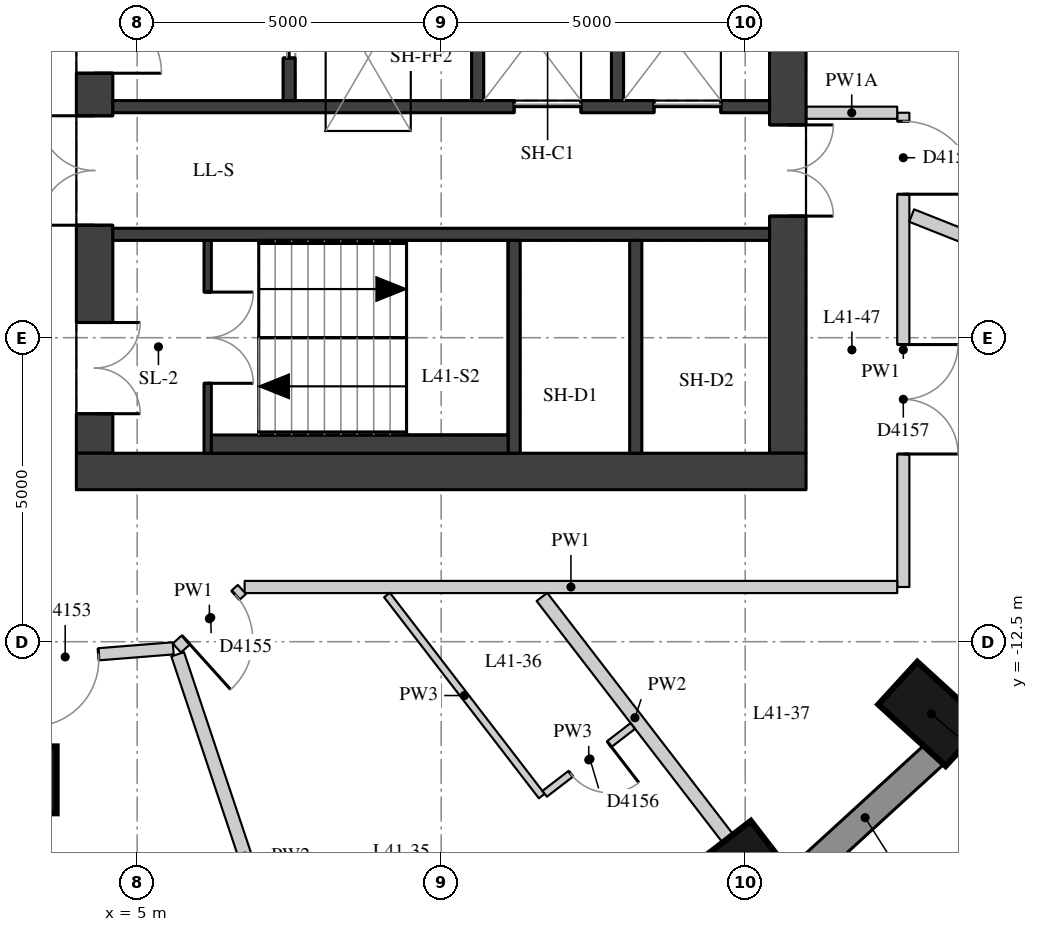
"""IFC4 building model, lengths in metres.
Left out: names, types, materials, properties, quantities, classifications, styles, units other than length and angle.
Written with IfcOpenShell. Run it as: python <this file> out.ifc"""

import sys

from ifc_helpers import new_model, si_unit, direction, frame, frame_2d, origin, origin_2d, place, context, subcontext, project, spatial, rectangle, extrude, element, fill, save


model = new_model("IFC4")
c1 = context("Model", 3, precision=1e-05, world=origin(), true_north=direction((0.0, 1.0)))
c2 = subcontext(c1, "Body", "Model", "MODEL_VIEW")
j1 = project(units=[si_unit("LENGTHUNIT", "METRE"), si_unit("PLANEANGLEUNIT", "RADIAN")], contexts=[c1])
p1 = place(None, origin())
s1 = spatial("IfcSite", under=j1, at=p1, CompositionType="ELEMENT")
p2 = place(p1, origin())
s2 = spatial("IfcBuilding", under=s1, at=p2, CompositionType="ELEMENT")
p3 = place(p2, frame((0.0, 0.0, 148.4)))
s3 = spatial("IfcBuildingStorey", under=s2, at=p3, CompositionType="ELEMENT", Elevation=148.4)
for number, where, z_axis, x_axis in (
    (1, (15.173, -16.332, 0.0), (0.0, 0.0, 1.0), (0.61, -0.792, 0.0)),
    (2, (18.064, -13.688, 0.0), (0.0, 0.0, 1.0), (0.738, -0.675, 0.0)),
):
    element("IfcColumn", number, at=place(p3, frame(where, z_axis=z_axis, x_axis=x_axis)), inside=s3, PredefinedType="COLUMN", context=c2, shape_type="SweptSolid", body=[
        extrude(rectangle(XDim=1.5, YDim=0.95, at=origin_2d()), origin(), (0.0, 0.0, 1.0), 3.3),
    ])
p4 = place(p3, frame((3.126, -14.772, 0.0), z_axis=(0.0, 0.0, 1.0), x_axis=(1.0, 0.0, 0.0)))
e3 = element("IfcColumn", 3, at=p4, inside=s3, PredefinedType="COLUMN", context=c2, shape_type="SweptSolid", body=[
    extrude(rectangle(XDim=1.1, YDim=1.1, at=origin_2d()), origin(), (0.0, 0.0, 1.0), 3.3),
])
p5 = place(p3, frame((15.83, -16.439, 0.0), z_axis=(0.0, 0.0, 1.0), x_axis=(0.737808755941, 0.675009807082, 0.0)))
e4 = element("IfcWall", 4, at=p5, inside=s3, PredefinedType="SOLIDWALL", context=c2, shape_type="SweptSolid", body=[
    extrude(rectangle(XDim=3.094, YDim=0.45, at=frame_2d((1.547, 0.0))), origin(), (0.0, 0.0, 1.0), 3.02),
])
p6 = place(p3, frame((4.3, -9.4, 0.0), z_axis=(0.0, 0.0, 1.0), x_axis=(0.0, 1.0, 0.0)))
e5 = element("IfcWall", 5, at=p6, inside=s3, PredefinedType="SHEAR", context=c2, shape_type="SweptSolid", body=[
    extrude(rectangle(XDim=18.8, YDim=0.6, at=frame_2d((9.4, 0.0))), origin(), (0.0, 0.0, 1.0), 3.02),
])
p7 = place(p6, frame((0.65, 0.0, 0.0)))
e6 = element("IfcOpeningElement", 6, at=p7, cuts=e5, PredefinedType="OPENING", context=c2, shape_type="SweptSolid", body=[
    extrude(rectangle(XDim=1.5, YDim=2.1, at=frame_2d((0.75, 1.05))), frame((0.0, 0.31, 0.0), z_axis=(0.0, -1.0, 0.0), x_axis=(1.0, 0.0, 0.0)), (0.0, 0.0, 1.0), 0.62),
])
p8 = place(p6, frame((3.75, 0.0, 0.0)))
e7 = element("IfcOpeningElement", 7, at=p8, cuts=e5, PredefinedType="OPENING", context=c2, shape_type="SweptSolid", body=[
    extrude(rectangle(XDim=1.8, YDim=2.1, at=frame_2d((0.9, 1.05))), frame((0.0, 0.31, 0.0), z_axis=(0.0, -1.0, 0.0), x_axis=(1.0, 0.0, 0.0)), (0.0, 0.0, 1.0), 0.62),
])
p9 = place(p6, frame((6.25, 0.0, 0.0)))
e8 = element("IfcOpeningElement", 8, at=p9, cuts=e5, PredefinedType="OPENING", context=c2, shape_type="SweptSolid", body=[
    extrude(rectangle(XDim=1.1, YDim=2.1, at=frame_2d((0.55, 1.05))), frame((0.0, 0.31, 0.0), z_axis=(0.0, -1.0, 0.0), x_axis=(1.0, 0.0, 0.0)), (0.0, 0.0, 1.0), 0.62),
])
p10 = place(p6, frame((8.9, 0.0, 0.0)))
e9 = element("IfcOpeningElement", 9, at=p10, cuts=e5, PredefinedType="OPENING", context=c2, shape_type="SweptSolid", body=[
    extrude(rectangle(XDim=1.0, YDim=2.1, at=frame_2d((0.5, 1.05))), frame((0.0, 0.31, 0.0), z_axis=(0.0, -1.0, 0.0), x_axis=(1.0, 0.0, 0.0)), (0.0, 0.0, 1.0), 0.62),
])
p11 = place(p6, frame((11.45, 0.0, 0.0)))
e10 = element("IfcOpeningElement", 10, at=p11, cuts=e5, PredefinedType="OPENING", context=c2, shape_type="SweptSolid", body=[
    extrude(rectangle(XDim=1.1, YDim=2.1, at=frame_2d((0.55, 1.05))), frame((0.0, 0.31, 0.0), z_axis=(0.0, -1.0, 0.0), x_axis=(1.0, 0.0, 0.0)), (0.0, 0.0, 1.0), 0.62),
])
p12 = place(p6, frame((13.25, 0.0, 0.0)))
e11 = element("IfcOpeningElement", 11, at=p12, cuts=e5, PredefinedType="OPENING", context=c2, shape_type="SweptSolid", body=[
    extrude(rectangle(XDim=1.8, YDim=2.1, at=frame_2d((0.9, 1.05))), frame((0.0, 0.31, 0.0), z_axis=(0.0, -1.0, 0.0), x_axis=(1.0, 0.0, 0.0)), (0.0, 0.0, 1.0), 0.62),
])
p13 = place(p6, frame((16.65, 0.0, 0.0)))
e12 = element("IfcOpeningElement", 12, at=p13, cuts=e5, PredefinedType="OPENING", context=c2, shape_type="SweptSolid", body=[
    extrude(rectangle(XDim=1.5, YDim=2.1, at=frame_2d((0.75, 1.05))), frame((0.0, 0.31, 0.0), z_axis=(0.0, -1.0, 0.0), x_axis=(1.0, 0.0, 0.0)), (0.0, 0.0, 1.0), 0.62),
])
p14 = place(p3, frame((15.7, -9.4, 0.0), z_axis=(0.0, 0.0, 1.0), x_axis=(0.0, 1.0, 0.0)))
e13 = element("IfcWall", 13, at=p14, inside=s3, PredefinedType="SHEAR", context=c2, shape_type="SweptSolid", body=[
    extrude(rectangle(XDim=18.8, YDim=0.6, at=frame_2d((9.4, 0.0))), origin(), (0.0, 0.0, 1.0), 3.02),
])
p15 = place(p14, frame((13.4, 0.0, 0.0)))
e14 = element("IfcOpeningElement", 14, at=p15, cuts=e13, PredefinedType="OPENING", context=c2, shape_type="SweptSolid", body=[
    extrude(rectangle(XDim=1.5, YDim=2.1, at=frame_2d((0.75, 1.05))), frame((0.0, 0.31, 0.0), z_axis=(0.0, -1.0, 0.0), x_axis=(1.0, 0.0, 0.0)), (0.0, 0.0, 1.0), 0.62),
])
p16 = place(p14, frame((3.9, 0.0, 0.0)))
e15 = element("IfcOpeningElement", 15, at=p16, cuts=e13, PredefinedType="OPENING", context=c2, shape_type="SweptSolid", body=[
    extrude(rectangle(XDim=1.5, YDim=2.1, at=frame_2d((0.75, 1.05))), frame((0.0, 0.31, 0.0), z_axis=(0.0, -1.0, 0.0), x_axis=(1.0, 0.0, 0.0)), (0.0, 0.0, 1.0), 0.62),
])
p17 = place(p3, frame((4.0, -9.7, 0.0), z_axis=(0.0, 0.0, 1.0), x_axis=(1.0, 0.0, 0.0)))
e16 = element("IfcWall", 16, at=p17, inside=s3, PredefinedType="SHEAR", context=c2, shape_type="SweptSolid", body=[
    extrude(rectangle(XDim=12.0, YDim=0.6, at=frame_2d((6.0, 0.0))), origin(), (0.0, 0.0, 1.0), 3.02),
])
p18 = place(p3, frame((4.6, -3.7, 0.0), z_axis=(0.0, 0.0, 1.0), x_axis=(1.0, 0.0, 0.0)))
e17 = element("IfcWall", 17, at=p18, inside=s3, PredefinedType="SHEAR", context=c2, shape_type="SweptSolid", body=[
    extrude(rectangle(XDim=10.8, YDim=0.2, at=frame_2d((5.4, 0.0))), origin(), (0.0, 0.0, 1.0), 3.02),
])
p19 = place(p18, frame((6.6, 0.0, 0.0)))
e18 = element("IfcOpeningElement", 18, at=p19, cuts=e17, PredefinedType="OPENING", context=c2, shape_type="SweptSolid", body=[
    extrude(rectangle(XDim=1.1, YDim=2.1, at=frame_2d((0.55, 1.05))), frame((0.0, 0.11, 0.0), z_axis=(0.0, -1.0, 0.0), x_axis=(1.0, 0.0, 0.0)), (0.0, 0.0, 1.0), 0.22),
])
p20 = place(p18, frame((8.9, 0.0, 0.0)))
e19 = element("IfcOpeningElement", 19, at=p20, cuts=e17, PredefinedType="OPENING", context=c2, shape_type="SweptSolid", body=[
    extrude(rectangle(XDim=1.1, YDim=2.1, at=frame_2d((0.55, 1.05))), frame((0.0, 0.11, 0.0), z_axis=(0.0, -1.0, 0.0), x_axis=(1.0, 0.0, 0.0)), (0.0, 0.0, 1.0), 0.22),
])
p21 = place(p3, frame((4.6, -5.8, 0.0), z_axis=(0.0, 0.0, 1.0), x_axis=(1.0, 0.0, 0.0)))
e20 = element("IfcWall", 20, at=p21, inside=s3, PredefinedType="SHEAR", context=c2, shape_type="SweptSolid", body=[
    extrude(rectangle(XDim=10.8, YDim=0.2, at=frame_2d((5.4, 0.0))), origin(), (0.0, 0.0, 1.0), 3.02),
])
for number, where, z_axis, x_axis in (
    (21, (11.2, -9.4, 0.0), (0.0, 0.0, 1.0), (0.0, 1.0, 0.0)),
    (22, (13.2, -9.4, 0.0), (0.0, 0.0, 1.0), (0.0, 1.0, 0.0)),
):
    element("IfcWall", number, at=place(p3, frame(where, z_axis=z_axis, x_axis=x_axis)), inside=s3, PredefinedType="SHEAR", context=c2, shape_type="SweptSolid", body=[
        extrude(rectangle(XDim=3.5, YDim=0.2, at=frame_2d((1.75, 0.0))), origin(), (0.0, 0.0, 1.0), 3.02),
    ])
p22 = place(p3, frame((7.5, -3.6, 0.0), z_axis=(0.0, 0.0, 1.0), x_axis=(0.0, 1.0, 0.0)))
e23 = element("IfcWall", 23, at=p22, inside=s3, PredefinedType="SHEAR", context=c2, shape_type="SweptSolid", body=[
    extrude(rectangle(XDim=2.5, YDim=0.2, at=frame_2d((1.25, 0.0))), origin(), (0.0, 0.0, 1.0), 3.02),
])
p23 = place(p22, frame((0.7, 0.0, 0.0)))
e24 = element("IfcOpeningElement", 24, at=p23, cuts=e23, PredefinedType="OPENING", context=c2, shape_type="SweptSolid", body=[
    extrude(rectangle(XDim=1.1, YDim=2.1, at=frame_2d((0.55, 1.05))), frame((0.0, 0.11, 0.0), z_axis=(0.0, -1.0, 0.0), x_axis=(1.0, 0.0, 0.0)), (0.0, 0.0, 1.0), 0.22),
])
for number, where, z_axis, x_axis in (
    (25, (10.6, -3.6, 0.0), (0.0, 0.0, 1.0), (0.0, 1.0, 0.0)),
    (26, (12.9, -3.6, 0.0), (0.0, 0.0, 1.0), (0.0, 1.0, 0.0)),
):
    element("IfcWall", number, at=place(p3, frame(where, z_axis=z_axis, x_axis=x_axis)), inside=s3, PredefinedType="SHEAR", context=c2, shape_type="SweptSolid", body=[
        extrude(rectangle(XDim=2.5, YDim=0.2, at=frame_2d((1.25, 0.0))), origin(), (0.0, 0.0, 1.0), 3.02),
    ])
p24 = place(p3, frame((6.16, -9.4, 0.0), z_axis=(0.0, 0.0, 1.0), x_axis=(0.0, 1.0, 0.0)))
e27 = element("IfcWall", 27, at=p24, inside=s3, PredefinedType="SHEAR", context=c2, shape_type="SweptSolid", body=[
    extrude(rectangle(XDim=3.5, YDim=0.12, at=frame_2d((1.75, 0.0))), origin(), (0.0, 0.0, 1.0), 3.02),
])
p25 = place(p24, frame((1.15, 0.0, 0.0)))
e28 = element("IfcOpeningElement", 28, at=p25, cuts=e27, PredefinedType="OPENING", context=c2, shape_type="SweptSolid", body=[
    extrude(rectangle(XDim=1.5, YDim=2.1, at=frame_2d((0.75, 1.05))), frame((0.0, 0.07, 0.0), z_axis=(0.0, -1.0, 0.0), x_axis=(1.0, 0.0, 0.0)), (0.0, 0.0, 1.0), 0.14),
])
p26 = place(p3, frame((6.22, -9.25, 0.0), z_axis=(0.0, 0.0, 1.0), x_axis=(1.0, 0.0, 0.0)))
e29 = element("IfcWall", 29, at=p26, inside=s3, PredefinedType="PARTITIONING", context=c2, shape_type="SweptSolid", body=[
    extrude(rectangle(XDim=4.88, YDim=0.3, at=frame_2d((2.44, 0.0))), origin(), (0.0, 0.0, 1.0), 3.02),
])
p27 = place(p3, frame((17.6, -3.8, 0.0), z_axis=(0.0, 0.0, 1.0), x_axis=(0.0, -1.0, 0.0)))
e30 = element("IfcWall", 30, at=p27, inside=s3, PredefinedType="PARTITIONING", context=c2, shape_type="SweptSolid", body=[
    extrude(rectangle(XDim=7.8, YDim=0.2, at=frame_2d((3.9, 0.0))), origin(), (0.0, 0.0, 1.0), 3.02),
])
p28 = place(p27, frame((3.813, 0.0, 0.0)))
e31 = element("IfcOpeningElement", 31, at=p28, cuts=e30, PredefinedType="OPENING", context=c2, shape_type="SweptSolid", body=[
    extrude(rectangle(XDim=1.8, YDim=2.1, at=frame_2d((0.9, 1.05))), frame((0.0, 0.11, 0.0), z_axis=(0.0, -1.0, 0.0), x_axis=(1.0, 0.0, 0.0)), (0.0, 0.0, 1.0), 0.22),
])
p29 = place(p27, frame((0.14, 0.0, 0.0)))
e32 = element("IfcOpeningElement", 32, at=p29, cuts=e30, PredefinedType="OPENING", context=c2, shape_type="SweptSolid", body=[
    extrude(rectangle(XDim=1.2, YDim=2.1, at=frame_2d((0.6, 1.05))), frame((0.0, 0.11, 0.0), z_axis=(0.0, -1.0, 0.0), x_axis=(1.0, 0.0, 0.0)), (0.0, 0.0, 1.0), 0.22),
])
p30 = place(p3, frame((17.5, -11.6, 0.0), z_axis=(0.0, 0.0, 1.0), x_axis=(-1.0, 0.0, 0.0)))
e33 = element("IfcWall", 33, at=p30, inside=s3, PredefinedType="PARTITIONING", context=c2, shape_type="SweptSolid", body=[
    extrude(rectangle(XDim=10.732, YDim=0.2, at=frame_2d((5.366, 0.0))), origin(), (0.0, 0.0, 1.0), 3.02),
])
p31 = place(p3, frame((6.723, -11.64, 0.0), z_axis=(0.0, 0.0, 1.0), x_axis=(-0.743032656565, -0.669255161562, 0.0)))
e34 = element("IfcWall", 34, at=p31, inside=s3, PredefinedType="PARTITIONING", context=c2, shape_type="SweptSolid", body=[
    extrude(rectangle(XDim=1.439, YDim=0.2, at=frame_2d((0.72, 0.0))), origin(), (0.0, 0.0, 1.0), 3.02),
])
p32 = place(p31, frame((0.14, 0.0, 0.0)))
e35 = element("IfcOpeningElement", 35, at=p32, cuts=e34, PredefinedType="OPENING", context=c2, shape_type="SweptSolid", body=[
    extrude(rectangle(XDim=1.1, YDim=2.1, at=frame_2d((0.55, 1.05))), frame((0.0, 0.11, 0.0), z_axis=(0.0, -1.0, 0.0), x_axis=(1.0, 0.0, 0.0)), (0.0, 0.0, 1.0), 0.22),
])
p33 = place(p3, frame((5.593, -12.609, 0.0), z_axis=(0.0, 0.0, 1.0), x_axis=(-0.99682930336, -0.079569717626, 0.0)))
e36 = element("IfcWall", 36, at=p33, inside=s3, PredefinedType="PARTITIONING", context=c2, shape_type="SweptSolid", body=[
    extrude(rectangle(XDim=8.349, YDim=0.2, at=frame_2d((4.174, 0.0))), origin(), (0.0, 0.0, 1.0), 3.02),
])
p34 = place(p33, frame((1.232, 0.0, 0.0)))
e37 = element("IfcOpeningElement", 37, at=p34, cuts=e36, PredefinedType="OPENING", context=c2, shape_type="SweptSolid", body=[
    extrude(rectangle(XDim=1.1, YDim=2.1, at=frame_2d((0.55, 1.05))), frame((0.0, 0.11, 0.0), z_axis=(0.0, -1.0, 0.0), x_axis=(1.0, 0.0, 0.0)), (0.0, 0.0, 1.0), 0.22),
])
p35 = place(p3, frame((16.004, -3.8, 0.0), z_axis=(0.0, 0.0, 1.0), x_axis=(1.0, 0.0, 0.0)))
e38 = element("IfcWall", 38, at=p35, inside=s3, PredefinedType="PARTITIONING", context=c2, shape_type="SweptSolid", body=[
    extrude(rectangle(XDim=1.496, YDim=0.2, at=frame_2d((0.748, 0.0))), origin(), (0.0, 0.0, 1.0), 2.57),
])
p36 = place(p3, frame((7.883, -19.345, 0.0), z_axis=(0.0, 0.0, 1.0), x_axis=(-0.31671959997, 0.948519211716, 0.0)))
e39 = element("IfcWall", 39, at=p36, inside=s3, PredefinedType="PARTITIONING", context=c2, shape_type="SweptSolid", body=[
    extrude(rectangle(XDim=6.999, YDim=0.22, at=frame_2d((3.499, 0.0))), origin(), (0.0, 0.0, 1.0), 3.02),
])
p37 = place(p3, frame((14.716, -15.737, 0.0), z_axis=(0.0, 0.0, 1.0), x_axis=(-0.609986007715, 0.792412184657, 0.0)))
e40 = element("IfcWall", 40, at=p37, inside=s3, PredefinedType="PARTITIONING", context=c2, shape_type="SweptSolid", body=[
    extrude(rectangle(XDim=5.015, YDim=0.22, at=frame_2d((2.507, 0.0))), origin(), (0.0, 0.0, 1.0), 3.02),
])
p38 = place(p3, frame((21.439, -6.96, 0.0), z_axis=(0.0, 0.0, 1.0), x_axis=(-0.929517399972, 0.368778257426, 0.0)))
e41 = element("IfcWall", 41, at=p38, inside=s3, PredefinedType="PARTITIONING", context=c2, shape_type="SweptSolid", body=[
    extrude(rectangle(XDim=3.982, YDim=0.22, at=frame_2d((1.991, 0.0))), origin(), (0.0, 0.0, 1.0), 3.02),
])
p39 = place(p3, frame((9.109, -11.732, 0.0), z_axis=(0.0, 0.0, 1.0), x_axis=(0.609996270026, -0.79240428479, 0.0)))
e42 = element("IfcWall", 42, at=p39, inside=s3, PredefinedType="PARTITIONING", context=c2, shape_type="SweptSolid", body=[
    extrude(rectangle(XDim=4.173, YDim=0.12, at=frame_2d((2.087, 0.0))), origin(), (0.0, 0.0, 1.0), 3.02),
])
p40 = place(p3, frame((11.702, -15.002, 0.0), z_axis=(0.0, 0.0, 1.0), x_axis=(0.792395776304, 0.610007322657, 0.0)))
e43 = element("IfcWall", 43, at=p40, inside=s3, PredefinedType="PARTITIONING", context=c2, shape_type="SweptSolid", body=[
    extrude(rectangle(XDim=1.83, YDim=0.12, at=frame_2d((0.915, 0.0))), origin(), (0.0, 0.0, 1.0), 3.02),
])
p41 = place(p40, frame((0.54, 0.0, 0.0)))
e44 = element("IfcOpeningElement", 44, at=p41, cuts=e43, PredefinedType="OPENING", context=c2, shape_type="SweptSolid", body=[
    extrude(rectangle(XDim=0.8, YDim=2.1, at=frame_2d((0.4, 1.05))), frame((0.0, 0.07, 0.0), z_axis=(0.0, -1.0, 0.0), x_axis=(1.0, 0.0, 0.0)), (0.0, 0.0, 1.0), 0.14),
])
p42 = place(p7, origin())
e45 = element("IfcDoor", 45, at=p42, inside=s3, OperationType="DOUBLE_DOOR_SINGLE_SWING", PredefinedType="DOOR", context=c2, shape_type="SweptSolid", body=[
    extrude(rectangle(XDim=1.5, YDim=2.1, at=frame_2d((0.75, 1.05))), frame((0.0, 0.025, 0.0), z_axis=(0.0, -1.0, 0.0), x_axis=(1.0, 0.0, 0.0)), (0.0, 0.0, 1.0), 0.05),
])
fill(e6, e45)
p43 = place(p8, origin())
e46 = element("IfcDoor", 46, at=p43, inside=s3, OperationType="DOUBLE_DOOR_SINGLE_SWING", PredefinedType="DOOR", context=c2, shape_type="SweptSolid", body=[
    extrude(rectangle(XDim=1.8, YDim=2.1, at=frame_2d((0.9, 1.05))), frame((0.0, 0.025, 0.0), z_axis=(0.0, -1.0, 0.0), x_axis=(1.0, 0.0, 0.0)), (0.0, 0.0, 1.0), 0.05),
])
fill(e7, e46)
p44 = place(p9, origin())
e47 = element("IfcDoor", 47, at=p44, inside=s3, OperationType="SINGLE_SWING_RIGHT", PredefinedType="DOOR", context=c2, shape_type="SweptSolid", body=[
    extrude(rectangle(XDim=1.1, YDim=2.1, at=frame_2d((0.55, 1.05))), frame((0.0, 0.025, 0.0), z_axis=(0.0, -1.0, 0.0), x_axis=(1.0, 0.0, 0.0)), (0.0, 0.0, 1.0), 0.05),
])
fill(e8, e47)
p45 = place(p16, origin())
e48 = element("IfcDoor", 48, at=p45, inside=s3, OperationType="DOUBLE_DOOR_SINGLE_SWING", PredefinedType="DOOR", context=c2, shape_type="SweptSolid", body=[
    extrude(rectangle(XDim=1.5, YDim=2.1, at=frame_2d((0.75, 1.05))), frame((0.0, 0.025, 0.0), z_axis=(0.0, -1.0, 0.0), x_axis=(1.0, 0.0, 0.0)), (0.0, 0.0, 1.0), 0.05),
])
fill(e15, e48)
p46 = place(p25, origin())
e49 = element("IfcDoor", 49, at=p46, inside=s3, OperationType="DOUBLE_DOOR_SINGLE_SWING", PredefinedType="DOOR", context=c2, shape_type="SweptSolid", body=[
    extrude(rectangle(XDim=1.5, YDim=2.1, at=frame_2d((0.75, 1.05))), frame((0.0, 0.025, 0.0), z_axis=(0.0, -1.0, 0.0), x_axis=(1.0, 0.0, 0.0)), (0.0, 0.0, 1.0), 0.05),
])
fill(e28, e49)
p47 = place(p19, origin())
e50 = element("IfcDoor", 50, at=p47, inside=s3, OperationType="DOUBLE_DOOR_SLIDING", PredefinedType="DOOR", context=c2, shape_type="SweptSolid", body=[
    extrude(rectangle(XDim=1.1, YDim=2.1, at=frame_2d((0.55, 1.05))), frame((0.0, 0.025, 0.0), z_axis=(0.0, -1.0, 0.0), x_axis=(1.0, 0.0, 0.0)), (0.0, 0.0, 1.0), 0.05),
])
fill(e18, e50)
p48 = place(p20, origin())
e51 = element("IfcDoor", 51, at=p48, inside=s3, OperationType="DOUBLE_DOOR_SLIDING", PredefinedType="DOOR", context=c2, shape_type="SweptSolid", body=[
    extrude(rectangle(XDim=1.1, YDim=2.1, at=frame_2d((0.55, 1.05))), frame((0.0, 0.025, 0.0), z_axis=(0.0, -1.0, 0.0), x_axis=(1.0, 0.0, 0.0)), (0.0, 0.0, 1.0), 0.05),
])
fill(e19, e51)
p49 = place(p23, origin())
e52 = element("IfcDoor", 52, at=p49, inside=s3, OperationType="DOUBLE_DOOR_SLIDING", PredefinedType="DOOR", context=c2, shape_type="SweptSolid", body=[
    extrude(rectangle(XDim=1.1, YDim=2.1, at=frame_2d((0.55, 1.05))), frame((0.0, 0.025, 0.0), z_axis=(0.0, -1.0, 0.0), x_axis=(1.0, 0.0, 0.0)), (0.0, 0.0, 1.0), 0.05),
])
fill(e24, e52)
p50 = place(p34, origin())
e53 = element("IfcDoor", 53, at=p50, inside=s3, OperationType="SINGLE_SWING_RIGHT", PredefinedType="DOOR", context=c2, shape_type="SweptSolid", body=[
    extrude(rectangle(XDim=1.1, YDim=2.1, at=frame_2d((0.55, 1.05))), frame((0.0, 0.025, 0.0), z_axis=(0.0, -1.0, 0.0), x_axis=(1.0, 0.0, 0.0)), (0.0, 0.0, 1.0), 0.05),
])
fill(e37, e53)
p51 = place(p32, origin())
e54 = element("IfcDoor", 54, at=p51, inside=s3, OperationType="SINGLE_SWING_RIGHT", PredefinedType="DOOR", context=c2, shape_type="SweptSolid", body=[
    extrude(rectangle(XDim=1.1, YDim=2.1, at=frame_2d((0.55, 1.05))), frame((0.0, 0.025, 0.0), z_axis=(0.0, -1.0, 0.0), x_axis=(1.0, 0.0, 0.0)), (0.0, 0.0, 1.0), 0.05),
])
fill(e35, e54)
p52 = place(p41, origin())
e55 = element("IfcDoor", 55, at=p52, inside=s3, OperationType="SINGLE_SWING_LEFT", PredefinedType="DOOR", context=c2, shape_type="SweptSolid", body=[
    extrude(rectangle(XDim=0.8, YDim=2.1, at=frame_2d((0.4, 1.05))), frame((0.0, 0.025, 0.0), z_axis=(0.0, -1.0, 0.0), x_axis=(1.0, 0.0, 0.0)), (0.0, 0.0, 1.0), 0.05),
])
fill(e44, e55)
p53 = place(p28, origin())
e56 = element("IfcDoor", 56, at=p53, inside=s3, OperationType="DOUBLE_DOOR_SINGLE_SWING", PredefinedType="DOOR", context=c2, shape_type="SweptSolid", body=[
    extrude(rectangle(XDim=1.8, YDim=2.1, at=frame_2d((0.9, 1.05))), frame((0.0, 0.025, 0.0), z_axis=(0.0, -1.0, 0.0), x_axis=(1.0, 0.0, 0.0)), (0.0, 0.0, 1.0), 0.05),
])
fill(e31, e56)
p54 = place(p29, origin())
e57 = element("IfcDoor", 57, at=p54, inside=s3, OperationType="SINGLE_SWING_RIGHT", PredefinedType="DOOR", context=c2, shape_type="SweptSolid", body=[
    extrude(rectangle(XDim=1.2, YDim=2.1, at=frame_2d((0.6, 1.05))), frame((0.0, 0.025, 0.0), z_axis=(0.0, -1.0, 0.0), x_axis=(1.0, 0.0, 0.0)), (0.0, 0.0, 1.0), 0.05),
])
fill(e32, e57)
save(model, sys.argv[1])
